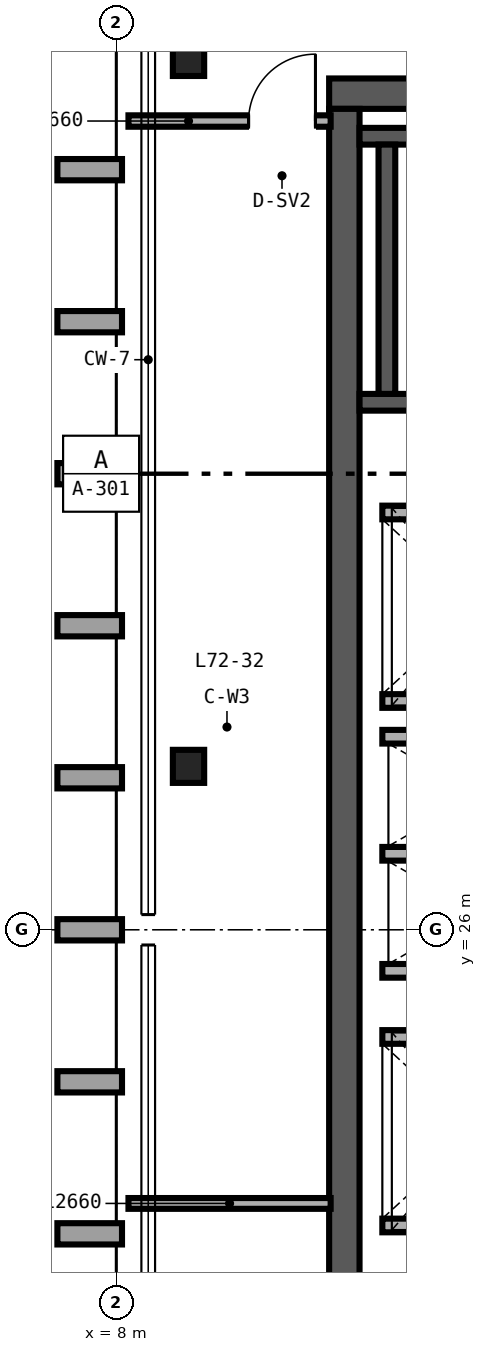
"""IFC4 building model, lengths in metres.
Left out: names, types, materials, properties, quantities, classifications, styles, units other than length and angle.
Written with IfcOpenShell. Run it as: python <this file> out.ifc"""

import sys

from ifc_helpers import new_model, si_unit, direction, frame, frame_2d, origin, origin_2d, place, context, subcontext, project, spatial, rectangle, i_section, extrude, source, transform, mapped, element, fill, save


model = new_model("IFC4")
c1 = context("Model", 3, precision=1e-05, world=origin(), true_north=direction((0.0, 1.0)))
c2 = subcontext(c1, "Body", "Model", "MODEL_VIEW")
j1 = project(units=[si_unit("LENGTHUNIT", "METRE"), si_unit("PLANEANGLEUNIT", "RADIAN")], contexts=[c1])
p1 = place(None, origin())
s1 = spatial("IfcSite", under=j1, at=p1, CompositionType="ELEMENT")
p2 = place(p1, origin())
s2 = spatial("IfcBuilding", under=s1, at=p2, CompositionType="ELEMENT")
p3 = place(p2, frame((0.0, 0.0, 283.2)))
s3 = spatial("IfcBuildingStorey", under=s2, at=p3, CompositionType="ELEMENT", Elevation=283.2)
p4 = place(p3, frame((10.8, 37.0, 0.0), z_axis=(0.0, 0.0, 1.0), x_axis=(1.0, 0.0, 0.0)))
e1 = element("IfcWall", 1, at=p4, inside=s3, PredefinedType="SHEAR", context=c2, shape_type="SweptSolid", body=[
    extrude(rectangle(XDim=12.4, YDim=0.4, at=frame_2d((6.2, 0.0))), origin(), (0.0, 0.0, 1.0), 3.38),
])
p5 = place(p4, frame((8.78, 0.0, 0.0)))
e2 = element("IfcOpeningElement", 2, at=p5, cuts=e1, PredefinedType="OPENING", context=c2, shape_type="SweptSolid", body=[
    extrude(rectangle(XDim=1.0, YDim=2.15, at=frame_2d((0.5, 1.075))), frame((0.0, 0.21, 0.0), z_axis=(0.0, -1.0, 0.0), x_axis=(1.0, 0.0, 0.0)), (0.0, 0.0, 1.0), 0.42),
])
p6 = place(p3, frame((11.0, 15.2, 0.0), z_axis=(0.0, 0.0, 1.0), x_axis=(0.0, 1.0, 0.0)))
e3 = element("IfcWall", 3, at=p6, inside=s3, PredefinedType="SHEAR", context=c2, shape_type="SweptSolid", body=[
    extrude(rectangle(XDim=21.6, YDim=0.4, at=frame_2d((10.8, 0.0))), origin(), (0.0, 0.0, 1.0), 3.38),
])
p7 = place(p3, frame((11.2, 32.94, 0.0), z_axis=(0.0, 0.0, 1.0), x_axis=(1.0, 0.0, 0.0)))
e4 = element("IfcWall", 4, at=p7, inside=s3, PredefinedType="SHEAR", context=c2, shape_type="SweptSolid", body=[
    extrude(rectangle(XDim=8.11, YDim=0.22, at=frame_2d((4.055, 0.0))), origin(), (0.0, 0.0, 1.0), 3.4),
])
p8 = place(p7, frame((0.72, 0.0, 0.0)))
e5 = element("IfcOpeningElement", 5, at=p8, cuts=e4, PredefinedType="OPENING", context=c2, shape_type="SweptSolid", body=[
    extrude(rectangle(XDim=1.05, YDim=2.15, at=frame_2d((0.525, 1.075))), frame((0.0, 0.12, 0.0), z_axis=(0.0, -1.0, 0.0), x_axis=(1.0, 0.0, 0.0)), (0.0, 0.0, 1.0), 0.24),
])
p9 = place(p3, frame((11.2, 36.44, 0.0), z_axis=(0.0, 0.0, 1.0), x_axis=(1.0, 0.0, 0.0)))
e6 = element("IfcWall", 6, at=p9, inside=s3, PredefinedType="SHEAR", context=c2, shape_type="SweptSolid", body=[
    extrude(rectangle(XDim=8.11, YDim=0.22, at=frame_2d((4.055, 0.0))), origin(), (0.0, 0.0, 1.0), 3.4),
])
p10 = place(p3, frame((11.56, 33.05, 0.0), z_axis=(0.0, 0.0, 1.0), x_axis=(0.0, 1.0, 0.0)))
e7 = element("IfcWall", 7, at=p10, inside=s3, PredefinedType="SHEAR", context=c2, shape_type="SweptSolid", body=[
    extrude(rectangle(XDim=3.28, YDim=0.22, at=frame_2d((1.64, 0.0))), origin(), (0.0, 0.0, 1.0), 3.4),
])
m1 = source(origin(), c2, "Body", "SweptSolid", [
    extrude(i_section(OverallWidth=0.412, OverallDepth=0.435, WebThickness=0.036, FlangeThickness=0.057, FilletRadius=0.025, at=origin_2d()), origin(), (0.0, 0.0, 1.0), 3.38),
])
for number, where, z_axis, x_axis in (
    (8, (8.95, 28.15, 0.0), (0.0, 0.0, 1.0), (1.0, 0.0, 0.0)),
    (9, (8.95, 37.45, 0.0), (0.0, 0.0, 1.0), (1.0, 0.0, 0.0)),
):
    element("IfcColumn", number, at=place(p3, frame(where, z_axis=z_axis, x_axis=x_axis)), inside=s3, PredefinedType="COLUMN", context=c2, shape_type="MappedRepresentation", body=[
        mapped(m1, transform((0.0, 0.0, 0.0), scale=1.0)),
    ])
for number, where, z_axis, x_axis in (
    (10, (11.5, 22.11, 0.0), (0.0, 0.0, 1.0), (1.0, 0.0, 0.0)),
    (11, (11.5, 24.59, 0.0), (0.0, 0.0, 1.0), (1.0, 0.0, 0.0)),
    (12, (11.5, 29.01, 0.0), (0.0, 0.0, 1.0), (1.0, 0.0, 0.0)),
    (13, (11.5, 31.49, 0.0), (0.0, 0.0, 1.0), (1.0, 0.0, 0.0)),
):
    element("IfcWall", number, at=place(p3, frame(where, z_axis=z_axis, x_axis=x_axis)), inside=s3, PredefinedType="SOLIDWALL", context=c2, shape_type="SweptSolid", body=[
        extrude(rectangle(XDim=2.5, YDim=0.18, at=frame_2d((1.25, 0.0))), origin(), (0.0, 0.0, 1.0), 3.38),
    ])
for number, where, z_axis, x_axis in (
    (14, (11.5, 25.46, 0.0), (0.0, 0.0, 1.0), (1.0, 0.0, 0.0)),
    (15, (11.5, 27.0, 0.0), (0.0, 0.0, 1.0), (1.0, 0.0, 0.0)),
    (16, (11.5, 28.54, 0.0), (0.0, 0.0, 1.0), (1.0, 0.0, 0.0)),
):
    element("IfcWall", number, at=place(p3, frame(where, z_axis=z_axis, x_axis=x_axis)), inside=s3, PredefinedType="SOLIDWALL", context=c2, shape_type="SweptSolid", body=[
        extrude(rectangle(XDim=2.51, YDim=0.18, at=frame_2d((1.255, 0.0))), origin(), (0.0, 0.0, 1.0), 3.38),
    ])
p11 = place(p3, frame((8.16, 36.64, 0.0), z_axis=(0.0, 0.0, 1.0), x_axis=(1.0, 0.0, 0.0)))
e17 = element("IfcWall", 17, at=p11, inside=s3, PredefinedType="PARTITIONING", context=c2, shape_type="SweptSolid", body=[
    extrude(rectangle(XDim=2.66, YDim=0.15, at=frame_2d((1.33, 0.0))), origin(), (0.0, 0.0, 1.0), 2.763),
])
p12 = place(p11, frame((1.58, 0.0, 0.0)))
e18 = element("IfcOpeningElement", 18, at=p12, cuts=e17, PredefinedType="OPENING", context=c2, shape_type="SweptSolid", body=[
    extrude(rectangle(XDim=0.88, YDim=2.15, at=frame_2d((0.44, 1.075))), frame((0.0, 0.085, 0.0), z_axis=(0.0, -1.0, 0.0), x_axis=(1.0, 0.0, 0.0)), (0.0, 0.0, 1.0), 0.17),
])
p13 = place(p3, frame((8.16, 22.4, 0.0), z_axis=(0.0, 0.0, 1.0), x_axis=(1.0, 0.0, 0.0)))
e19 = element("IfcWall", 19, at=p13, inside=s3, PredefinedType="PARTITIONING", context=c2, shape_type="SweptSolid", body=[
    extrude(rectangle(XDim=2.66, YDim=0.142, at=frame_2d((1.33, 0.0))), origin(), (0.0, 0.0, 1.0), 2.601),
])
m2 = source(origin(), c2, "Body", "SweptSolid", [
    extrude(rectangle(XDim=0.88, YDim=2.15, at=frame_2d((0.44, 1.075))), frame((0.0, 0.025, 0.0), z_axis=(0.0, -1.0, 0.0), x_axis=(1.0, 0.0, 0.0)), (0.0, 0.0, 1.0), 0.05),
])
p14 = place(p12, origin())
e20 = element("IfcDoor", 20, at=p14, inside=s3, OperationType="SINGLE_SWING_RIGHT", PredefinedType="DOOR", context=c2, shape_type="MappedRepresentation", body=[
    mapped(m2, transform((0.0, 0.0, 0.0), scale=1.0)),
])
fill(e18, e20)
save(model, sys.argv[1])
